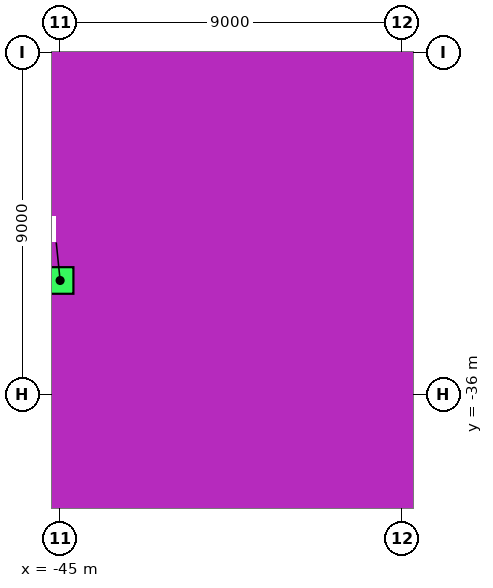
"""IFC4 building model, lengths in metres.
Left out: names, types, materials, properties, quantities, classifications, styles, units other than length and angle.
Written with IfcOpenShell. Run it as: python <this file> out.ifc"""

import sys

from ifc_helpers import new_model, si_unit, direction, frame, origin, origin_2d, place, context, subcontext, project, spatial, rectangle, extrude, element, save


model = new_model("IFC4")
c1 = context("Model", 3, precision=1e-05, world=origin(), true_north=direction((0.0, 1.0)))
c2 = subcontext(c1, "Body", "Model", "MODEL_VIEW")
j1 = project(units=[si_unit("LENGTHUNIT", "METRE"), si_unit("PLANEANGLEUNIT", "RADIAN")], contexts=[c1])
p1 = place(None, origin())
s1 = spatial("IfcSite", under=j1, at=p1, CompositionType="ELEMENT")
p2 = place(p1, origin())
s2 = spatial("IfcBuilding", under=s1, at=p2, CompositionType="ELEMENT")
p3 = place(p2, frame((0.0, 0.0, -4.5)))
s3 = spatial("IfcBuildingStorey", under=s2, at=p3, CompositionType="ELEMENT", Elevation=-4.5)
p4 = place(p3, frame((-45.0, -33.0, 0.0), z_axis=(0.0, 0.0, 1.0), x_axis=(1.0, 0.0, 0.0)))
e1 = element("IfcColumn", 1, at=p4, inside=s3, PredefinedType="COLUMN", context=c2, shape_type="SweptSolid", body=[
    extrude(rectangle(XDim=0.7, YDim=0.7, at=origin_2d()), origin(), (0.0, 0.0, 1.0), 4.0),
])
save(model, sys.argv[1])
